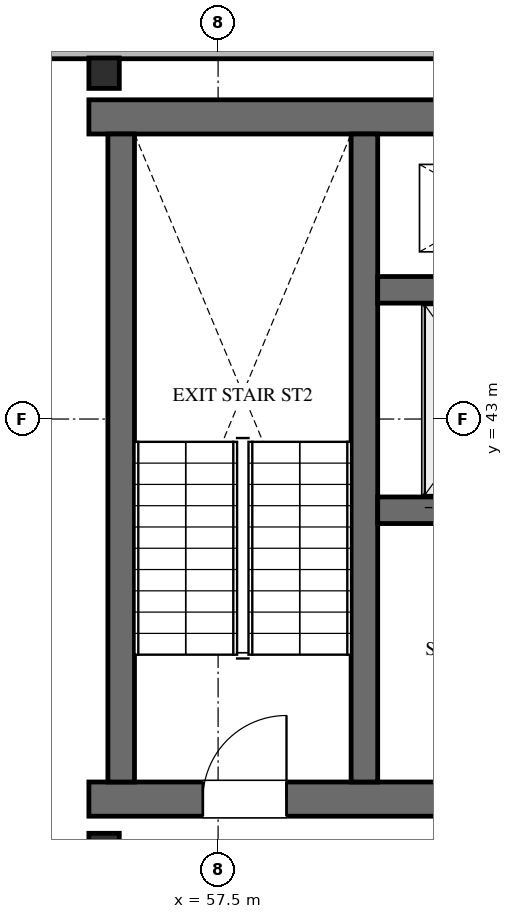
"""IFC4 building model, lengths in metres.
Left out: names, types, materials, properties, quantities, classifications, styles, units other than length and angle.
Written with IfcOpenShell. Run it as: python <this file> out.ifc"""

import sys

from ifc_helpers import new_model, si_unit, direction, frame, frame_2d, origin, origin_2d, place, context, subcontext, project, spatial, rectangle, hollow_rectangle, extrude, element, fill, save


model = new_model("IFC4")
c1 = context("Model", 3, precision=1e-05, world=origin(), true_north=direction((0.0, 1.0)))
c2 = subcontext(c1, "Body", "Model", "MODEL_VIEW")
j1 = project(units=[si_unit("LENGTHUNIT", "METRE"), si_unit("PLANEANGLEUNIT", "RADIAN")], contexts=[c1])
p1 = place(None, origin())
s1 = spatial("IfcSite", under=j1, at=p1, CompositionType="ELEMENT")
p2 = place(p1, origin())
s2 = spatial("IfcBuilding", under=s1, at=p2, CompositionType="ELEMENT")
p3 = place(p2, frame((0.0, 0.0, 319.2)))
s3 = spatial("IfcBuildingStorey", under=s2, at=p3, CompositionType="ELEMENT", Elevation=319.2)
p4 = place(p3, frame((55.8, 46.975, 0.0), z_axis=(0.0, 0.0, 1.0), x_axis=(1.0, 0.0, 0.0)))
e1 = element("IfcWall", 1, at=p4, inside=s3, PredefinedType="SHEAR", context=c2, shape_type="SweptSolid", body=[
    extrude(rectangle(XDim=10.5, YDim=0.45, at=frame_2d((5.25, 0.0))), origin(), (0.0, 0.0, 1.0), 3.6),
])
p5 = place(p3, frame((55.8, 38.0, 0.0), z_axis=(0.0, 0.0, 1.0), x_axis=(1.0, 0.0, 0.0)))
e2 = element("IfcWall", 2, at=p5, inside=s3, PredefinedType="SHEAR", context=c2, shape_type="SweptSolid", body=[
    extrude(rectangle(XDim=10.5, YDim=0.45, at=frame_2d((5.25, 0.0))), origin(), (0.0, 0.0, 1.0), 3.6),
])
p6 = place(p5, frame((1.5, 0.0, 0.0)))
e3 = element("IfcOpeningElement", 3, at=p6, cuts=e2, PredefinedType="OPENING", context=c2, shape_type="SweptSolid", body=[
    extrude(rectangle(XDim=1.1, YDim=2.2, at=frame_2d((0.55, 1.1))), frame((0.0, 0.235, 0.0), z_axis=(0.0, -1.0, 0.0), x_axis=(1.0, 0.0, 0.0)), (0.0, 0.0, 1.0), 0.47),
])
p7 = place(p5, frame((4.82, 0.0, 0.0)))
e4 = element("IfcOpeningElement", 4, at=p7, cuts=e2, PredefinedType="OPENING", context=c2, shape_type="SweptSolid", body=[
    extrude(rectangle(XDim=1.0, YDim=2.15, at=frame_2d((0.5, 1.075))), frame((0.0, 0.235, 0.0), z_axis=(0.0, -1.0, 0.0), x_axis=(1.0, 0.0, 0.0)), (0.0, 0.0, 1.0), 0.47),
])
p8 = place(p5, frame((8.05, 0.0, 0.0)))
e5 = element("IfcOpeningElement", 5, at=p8, cuts=e2, PredefinedType="OPENING", context=c2, shape_type="SweptSolid", body=[
    extrude(rectangle(XDim=1.1, YDim=2.2, at=frame_2d((0.55, 1.1))), frame((0.0, 0.235, 0.0), z_axis=(0.0, -1.0, 0.0), x_axis=(1.0, 0.0, 0.0)), (0.0, 0.0, 1.0), 0.47),
])
for number, where, z_axis, x_axis in (
    (6, (59.425, 38.225, 0.0), (0.0, 0.0, 1.0), (0.0, 1.0, 0.0)),
    (7, (56.225, 38.225, 0.0), (0.0, 0.0, 1.0), (0.0, 1.0, 0.0)),
):
    element("IfcWall", number, at=place(p3, frame(where, z_axis=z_axis, x_axis=x_axis)), inside=s3, PredefinedType="SHEAR", context=c2, shape_type="SweptSolid", body=[
        extrude(rectangle(XDim=8.525, YDim=0.35, at=frame_2d((4.262, 0.0))), origin(), (0.0, 0.0, 1.0), 3.6),
    ])
p9 = place(p3, frame((59.6, 41.8, 0.0), z_axis=(0.0, 0.0, 1.0), x_axis=(1.0, 0.0, 0.0)))
e8 = element("IfcWall", 8, at=p9, inside=s3, PredefinedType="SHEAR", context=c2, shape_type="SweptSolid", body=[
    extrude(rectangle(XDim=3.05, YDim=0.35, at=frame_2d((1.525, 0.0))), origin(), (0.0, 0.0, 1.0), 3.6),
])
p10 = place(p9, frame((0.92, 0.0, 0.0)))
e9 = element("IfcOpeningElement", 9, at=p10, cuts=e8, PredefinedType="OPENING", context=c2, shape_type="SweptSolid", body=[
    extrude(rectangle(XDim=1.2, YDim=2.2, at=frame_2d((0.6, 1.1))), frame((0.0, 0.185, 0.0), z_axis=(0.0, -1.0, 0.0), x_axis=(1.0, 0.0, 0.0)), (0.0, 0.0, 1.0), 0.37),
])
p11 = place(p3, frame((59.6, 44.7, 0.0), z_axis=(0.0, 0.0, 1.0), x_axis=(1.0, 0.0, 0.0)))
e10 = element("IfcWall", 10, at=p11, inside=s3, PredefinedType="SHEAR", context=c2, shape_type="SweptSolid", body=[
    extrude(rectangle(XDim=3.05, YDim=0.35, at=frame_2d((1.525, 0.0))), origin(), (0.0, 0.0, 1.0), 3.6),
])
for number, where, z_axis, x_axis in (
    (11, (56.0, 47.55, 0.0), (0.0, 0.0, 1.0), (1.0, 0.0, 0.0)),
    (12, (56.0, 37.35, 0.0), (0.0, 0.0, 1.0), (1.0, 0.0, 0.0)),
):
    element("IfcColumn", number, at=place(p3, frame(where, z_axis=z_axis, x_axis=x_axis)), inside=s3, PredefinedType="COLUMN", context=c2, shape_type="SweptSolid", body=[
        extrude(hollow_rectangle(XDim=0.4, YDim=0.4, WallThickness=0.016, at=origin_2d()), origin(), (0.0, 0.0, 1.0), 3.6),
    ])
p12 = place(p3, frame((46.158, 47.86, 0.0), z_axis=(0.0, 0.0, 1.0), x_axis=(1.0, 0.0, 0.0)))
e13 = element("IfcWall", 13, at=p12, inside=s3, PredefinedType="STANDARD", context=c2, shape_type="SweptSolid", body=[
    extrude(rectangle(XDim=21.181, YDim=0.24, at=frame_2d((10.591, 0.0))), origin(), (0.0, 0.0, 1.0), 2.709),
])
p13 = place(p6, origin())
e14 = element("IfcDoor", 14, at=p13, inside=s3, OperationType="SINGLE_SWING_RIGHT", PredefinedType="DOOR", context=c2, shape_type="SweptSolid", body=[
    extrude(rectangle(XDim=1.1, YDim=2.2, at=frame_2d((0.55, 1.1))), frame((0.0, 0.025, 0.0), z_axis=(0.0, -1.0, 0.0), x_axis=(1.0, 0.0, 0.0)), (0.0, 0.0, 1.0), 0.05),
])
fill(e3, e14)
save(model, sys.argv[1])
